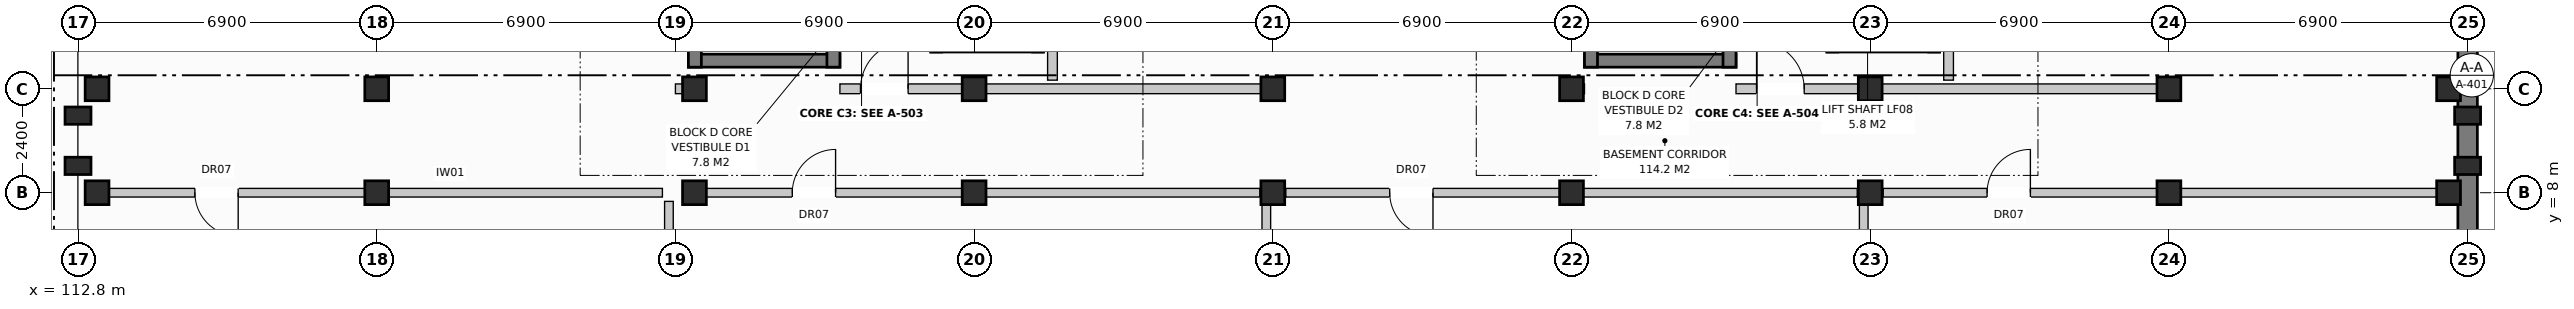
"""IFC4 building model, lengths in metres.
Left out: names, types, materials, properties, quantities, classifications, styles, units other than length and angle.
Written with IfcOpenShell. Run it as: python <this file> out.ifc"""

import sys

from ifc_helpers import new_model, si_unit, direction, frame, frame_2d, origin, origin_with_axes, origin_2d, place, context, subcontext, project, spatial, rectangle, extrude, element, fill, save


model = new_model("IFC4")
c1 = context("Model", 3, precision=1e-05, world=origin(), true_north=direction((0.0, 1.0)))
c2 = subcontext(c1, "Body", "Model", "MODEL_VIEW")
j1 = project(units=[si_unit("LENGTHUNIT", "METRE"), si_unit("PLANEANGLEUNIT", "RADIAN")], contexts=[c1])
p1 = place(None, origin())
s1 = spatial("IfcSite", under=j1, at=p1, CompositionType="ELEMENT")
p2 = place(p1, origin())
s2 = spatial("IfcBuilding", under=s1, at=p2, CompositionType="ELEMENT")
p3 = place(p2, frame((0.0, 0.0, -3.8)))
s3 = spatial("IfcBuildingStorey", under=s2, at=p3, CompositionType="ELEMENT", Elevation=-3.8)
for number, where, z_axis, x_axis in (
    (1, (113.24, 8.0, 0.0), (0.0, 0.0, 1.0), (1.0, 0.0, 0.0)),
    (2, (113.24, 10.4, 0.0), (0.0, 0.0, 1.0), (1.0, 0.0, 0.0)),
    (3, (119.7, 8.0, 0.0), (0.0, 0.0, 1.0), (1.0, 0.0, 0.0)),
    (4, (119.7, 10.4, 0.0), (0.0, 0.0, 1.0), (1.0, 0.0, 0.0)),
    (5, (127.04, 8.0, 0.0), (0.0, 0.0, 1.0), (1.0, 0.0, 0.0)),
    (6, (127.04, 10.4, 0.0), (0.0, 0.0, 1.0), (1.0, 0.0, 0.0)),
    (7, (133.5, 8.0, 0.0), (0.0, 0.0, 1.0), (1.0, 0.0, 0.0)),
    (8, (133.5, 10.4, 0.0), (0.0, 0.0, 1.0), (1.0, 0.0, 0.0)),
    (9, (140.4, 8.0, 0.0), (0.0, 0.0, 1.0), (1.0, 0.0, 0.0)),
    (10, (140.4, 10.4, 0.0), (0.0, 0.0, 1.0), (1.0, 0.0, 0.0)),
    (11, (147.3, 8.0, 0.0), (0.0, 0.0, 1.0), (1.0, 0.0, 0.0)),
    (12, (147.3, 10.4, 0.0), (0.0, 0.0, 1.0), (1.0, 0.0, 0.0)),
    (13, (154.2, 8.0, 0.0), (0.0, 0.0, 1.0), (1.0, 0.0, 0.0)),
    (14, (154.2, 10.4, 0.0), (0.0, 0.0, 1.0), (1.0, 0.0, 0.0)),
    (15, (161.1, 8.0, 0.0), (0.0, 0.0, 1.0), (1.0, 0.0, 0.0)),
    (16, (161.1, 10.4, 0.0), (0.0, 0.0, 1.0), (1.0, 0.0, 0.0)),
    (17, (167.56, 8.0, 0.0), (0.0, 0.0, 1.0), (1.0, 0.0, 0.0)),
    (18, (167.56, 10.4, 0.0), (0.0, 0.0, 1.0), (1.0, 0.0, 0.0)),
):
    element("IfcColumn", number, at=place(p3, frame(where, z_axis=z_axis, x_axis=x_axis)), inside=s3, PredefinedType="COLUMN", context=c2, shape_type="SweptSolid", body=[
        extrude(rectangle(XDim=0.55, YDim=0.55, at=origin_2d()), origin(), (0.0, 0.0, 1.0), 3.8),
    ])
for number, where, z_axis, x_axis in (
    (19, (168.0, 8.62, 0.0), (0.0, 0.0, 1.0), (0.0, 1.0, 0.0)),
    (20, (168.0, 9.78, 0.0), (0.0, 0.0, 1.0), (0.0, 1.0, 0.0)),
    (21, (112.8, 8.62, 0.0), (0.0, 0.0, 1.0), (0.0, 1.0, 0.0)),
    (22, (112.8, 9.78, 0.0), (0.0, 0.0, 1.0), (0.0, 1.0, 0.0)),
):
    element("IfcColumn", number, at=place(p3, frame(where, z_axis=z_axis, x_axis=x_axis)), inside=s3, PredefinedType="PILASTER", context=c2, shape_type="SweptSolid", body=[
        extrude(rectangle(XDim=0.4, YDim=0.6, at=origin_2d()), origin(), (0.0, 0.0, 1.0), 3.8),
    ])
p4 = place(p3, frame((168.0, 0.0, 0.0), z_axis=(0.0, 0.0, 1.0), x_axis=(0.0, 1.0, 0.0)))
e23 = element("IfcWall", 23, at=p4, inside=s3, PredefinedType="STANDARD", context=c2, shape_type="SweptSolid", body=[
    extrude(rectangle(XDim=116.0, YDim=0.45, at=frame_2d((58.0, 0.0))), origin(), (0.0, 0.0, 1.0), 3.48),
])
p5 = place(p3, frame((126.9, 11.05, 0.0), z_axis=(0.0, 0.0, 1.0), x_axis=(1.0, 0.0, 0.0)))
e24 = element("IfcWall", 24, at=p5, inside=s3, PredefinedType="SHEAR", context=c2, shape_type="SweptSolid", body=[
    extrude(rectangle(XDim=3.5, YDim=0.3, at=frame_2d((1.75, 0.0))), origin(), (0.0, 0.0, 1.0), 3.48),
])
p6 = place(p3, frame((127.05, 10.9, 0.0), z_axis=(0.0, 0.0, 1.0), x_axis=(0.0, 1.0, 0.0)))
e25 = element("IfcWall", 25, at=p6, inside=s3, PredefinedType="SHEAR", context=c2, shape_type="SweptSolid", body=[
    extrude(rectangle(XDim=7.5, YDim=0.3, at=frame_2d((3.75, 0.0))), origin(), (0.0, 0.0, 1.0), 3.48),
])
p7 = place(p3, frame((130.25, 10.9, 0.0), z_axis=(0.0, 0.0, 1.0), x_axis=(0.0, 1.0, 0.0)))
e26 = element("IfcWall", 26, at=p7, inside=s3, PredefinedType="SHEAR", context=c2, shape_type="SweptSolid", body=[
    extrude(rectangle(XDim=7.5, YDim=0.3, at=frame_2d((3.75, 0.0))), origin(), (0.0, 0.0, 1.0), 3.48),
])
p8 = place(p7, frame((5.7, 0.0, 0.0)))
e27 = element("IfcOpeningElement", 27, at=p8, cuts=e26, PredefinedType="OPENING", context=c2, shape_type="SweptSolid", body=[
    extrude(rectangle(XDim=1.15, YDim=2.15, at=frame_2d((0.575, 1.075))), frame((0.0, 0.162, 0.0), z_axis=(0.0, -1.0, 0.0), x_axis=(1.0, 0.0, 0.0)), (0.0, 0.0, 1.0), 0.324),
])
p9 = place(p3, frame((135.31, 10.6, 0.0), z_axis=(0.0, 0.0, 1.0), x_axis=(0.0, 1.0, 0.0)))
e28 = element("IfcWall", 28, at=p9, inside=s3, PredefinedType="PARTITIONING", context=c2, shape_type="SweptSolid", body=[
    extrude(rectangle(XDim=7.6, YDim=0.225, at=frame_2d((3.8, 0.0))), origin(), (0.0, 0.0, 1.0), 3.19),
])
p10 = place(p3, frame((126.6, 10.4, 0.0), z_axis=(0.0, 0.0, 1.0), x_axis=(1.0, 0.0, 0.0)))
e29 = element("IfcWall", 29, at=p10, inside=s3, PredefinedType="PARTITIONING", context=c2, shape_type="SweptSolid", body=[
    extrude(rectangle(XDim=0.3, YDim=0.225, at=frame_2d((0.15, 0.0))), origin(), (0.0, 0.0, 1.0), 3.48),
])
p11 = place(p3, frame((130.4, 10.4, 0.0), z_axis=(0.0, 0.0, 1.0), x_axis=(1.0, 0.0, 0.0)))
e30 = element("IfcWall", 30, at=p11, inside=s3, PredefinedType="PARTITIONING", context=c2, shape_type="SweptSolid", body=[
    extrude(rectangle(XDim=10.0, YDim=0.225, at=frame_2d((5.0, 0.0))), origin(), (0.0, 0.0, 1.0), 2.92),
])
p12 = place(p11, frame((0.475, 0.0, 0.0)))
e31 = element("IfcOpeningElement", 31, at=p12, cuts=e30, PredefinedType="OPENING", context=c2, shape_type="SweptSolid", body=[
    extrude(rectangle(XDim=1.1, YDim=2.15, at=frame_2d((0.55, 1.075))), frame((0.0, 0.125, 0.0), z_axis=(0.0, -1.0, 0.0), x_axis=(1.0, 0.0, 0.0)), (0.0, 0.0, 1.0), 0.249),
])
p13 = place(p3, frame((147.6, 11.05, 0.0), z_axis=(0.0, 0.0, 1.0), x_axis=(1.0, 0.0, 0.0)))
e32 = element("IfcWall", 32, at=p13, inside=s3, PredefinedType="SHEAR", context=c2, shape_type="SweptSolid", body=[
    extrude(rectangle(XDim=3.5, YDim=0.3, at=frame_2d((1.75, 0.0))), origin(), (0.0, 0.0, 1.0), 3.48),
])
p14 = place(p3, frame((147.75, 10.9, 0.0), z_axis=(0.0, 0.0, 1.0), x_axis=(0.0, 1.0, 0.0)))
e33 = element("IfcWall", 33, at=p14, inside=s3, PredefinedType="SHEAR", context=c2, shape_type="SweptSolid", body=[
    extrude(rectangle(XDim=7.5, YDim=0.3, at=frame_2d((3.75, 0.0))), origin(), (0.0, 0.0, 1.0), 3.48),
])
p15 = place(p3, frame((150.95, 10.9, 0.0), z_axis=(0.0, 0.0, 1.0), x_axis=(0.0, 1.0, 0.0)))
e34 = element("IfcWall", 34, at=p15, inside=s3, PredefinedType="SHEAR", context=c2, shape_type="SweptSolid", body=[
    extrude(rectangle(XDim=7.5, YDim=0.3, at=frame_2d((3.75, 0.0))), origin(), (0.0, 0.0, 1.0), 3.48),
])
p16 = place(p15, frame((5.7, 0.0, 0.0)))
e35 = element("IfcOpeningElement", 35, at=p16, cuts=e34, PredefinedType="OPENING", context=c2, shape_type="SweptSolid", body=[
    extrude(rectangle(XDim=1.15, YDim=2.15, at=frame_2d((0.575, 1.075))), frame((0.0, 0.162, 0.0), z_axis=(0.0, -1.0, 0.0), x_axis=(1.0, 0.0, 0.0)), (0.0, 0.0, 1.0), 0.324),
])
p17 = place(p3, frame((156.01, 10.6, 0.0), z_axis=(0.0, 0.0, 1.0), x_axis=(0.0, 1.0, 0.0)))
e36 = element("IfcWall", 36, at=p17, inside=s3, PredefinedType="PARTITIONING", context=c2, shape_type="SweptSolid", body=[
    extrude(rectangle(XDim=7.6, YDim=0.225, at=frame_2d((3.8, 0.0))), origin(), (0.0, 0.0, 1.0), 3.19),
])
p18 = place(p3, frame((147.3, 10.4, 0.0), z_axis=(0.0, 0.0, 1.0), x_axis=(1.0, 0.0, 0.0)))
e37 = element("IfcWall", 37, at=p18, inside=s3, PredefinedType="PARTITIONING", context=c2, shape_type="SweptSolid", body=[
    extrude(rectangle(XDim=0.3, YDim=0.225, at=frame_2d((0.15, 0.0))), origin(), (0.0, 0.0, 1.0), 3.48),
])
p19 = place(p3, frame((151.1, 10.4, 0.0), z_axis=(0.0, 0.0, 1.0), x_axis=(1.0, 0.0, 0.0)))
e38 = element("IfcWall", 38, at=p19, inside=s3, PredefinedType="PARTITIONING", context=c2, shape_type="SweptSolid", body=[
    extrude(rectangle(XDim=10.0, YDim=0.225, at=frame_2d((5.0, 0.0))), origin(), (0.0, 0.0, 1.0), 2.92),
])
p20 = place(p19, frame((0.475, 0.0, 0.0)))
e39 = element("IfcOpeningElement", 39, at=p20, cuts=e38, PredefinedType="OPENING", context=c2, shape_type="SweptSolid", body=[
    extrude(rectangle(XDim=1.1, YDim=2.15, at=frame_2d((0.55, 1.075))), frame((0.0, 0.125, 0.0), z_axis=(0.0, -1.0, 0.0), x_axis=(1.0, 0.0, 0.0)), (0.0, 0.0, 1.0), 0.249),
])
p21 = place(p3, frame((113.1, 8.0, 0.0), z_axis=(0.0, 0.0, 1.0), x_axis=(1.0, 0.0, 0.0)))
e40 = element("IfcWall", 40, at=p21, inside=s3, PredefinedType="PARTITIONING", context=c2, shape_type="SweptSolid", body=[
    extrude(rectangle(XDim=13.2, YDim=0.2, at=frame_2d((6.6, 0.0))), origin(), (0.0, 0.0, 1.0), 2.92),
])
p22 = place(p21, frame((2.4, 0.0, 0.0)))
e41 = element("IfcOpeningElement", 41, at=p22, cuts=e40, PredefinedType="OPENING", context=c2, shape_type="SweptSolid", body=[
    extrude(rectangle(XDim=1.0, YDim=2.15, at=frame_2d((0.5, 1.075))), frame((0.0, 0.112, 0.0), z_axis=(0.0, -1.0, 0.0), x_axis=(1.0, 0.0, 0.0)), (0.0, 0.0, 1.0), 0.224),
])
p23 = place(p3, frame((126.45, 0.3, 0.0), z_axis=(0.0, 0.0, 1.0), x_axis=(0.0, 1.0, 0.0)))
e42 = element("IfcWall", 42, at=p23, inside=s3, PredefinedType="PARTITIONING", context=c2, shape_type="SweptSolid", body=[
    extrude(rectangle(XDim=7.5, YDim=0.2, at=frame_2d((3.75, 0.0))), origin(), (0.0, 0.0, 1.0), 3.48),
])
p24 = place(p3, frame((126.9, 8.0, 0.0), z_axis=(0.0, 0.0, 1.0), x_axis=(1.0, 0.0, 0.0)))
e43 = element("IfcWall", 43, at=p24, inside=s3, PredefinedType="PARTITIONING", context=c2, shape_type="SweptSolid", body=[
    extrude(rectangle(XDim=13.2, YDim=0.2, at=frame_2d((6.6, 0.0))), origin(), (0.0, 0.0, 1.0), 2.92),
])
p25 = place(p24, frame((2.4, 0.0, 0.0)))
e44 = element("IfcOpeningElement", 44, at=p25, cuts=e43, PredefinedType="OPENING", context=c2, shape_type="SweptSolid", body=[
    extrude(rectangle(XDim=1.0, YDim=2.15, at=frame_2d((0.5, 1.075))), frame((0.0, 0.112, 0.0), z_axis=(0.0, -1.0, 0.0), x_axis=(1.0, 0.0, 0.0)), (0.0, 0.0, 1.0), 0.224),
])
p26 = place(p3, frame((140.25, 0.3, 0.0), z_axis=(0.0, 0.0, 1.0), x_axis=(0.0, 1.0, 0.0)))
e45 = element("IfcWall", 45, at=p26, inside=s3, PredefinedType="PARTITIONING", context=c2, shape_type="SweptSolid", body=[
    extrude(rectangle(XDim=7.5, YDim=0.2, at=frame_2d((3.75, 0.0))), origin(), (0.0, 0.0, 1.0), 3.48),
])
p27 = place(p3, frame((140.7, 8.0, 0.0), z_axis=(0.0, 0.0, 1.0), x_axis=(1.0, 0.0, 0.0)))
e46 = element("IfcWall", 46, at=p27, inside=s3, PredefinedType="PARTITIONING", context=c2, shape_type="SweptSolid", body=[
    extrude(rectangle(XDim=13.2, YDim=0.2, at=frame_2d((6.6, 0.0))), origin(), (0.0, 0.0, 1.0), 2.92),
])
p28 = place(p27, frame((2.4, 0.0, 0.0)))
e47 = element("IfcOpeningElement", 47, at=p28, cuts=e46, PredefinedType="OPENING", context=c2, shape_type="SweptSolid", body=[
    extrude(rectangle(XDim=1.0, YDim=2.15, at=frame_2d((0.5, 1.075))), frame((0.0, 0.112, 0.0), z_axis=(0.0, -1.0, 0.0), x_axis=(1.0, 0.0, 0.0)), (0.0, 0.0, 1.0), 0.224),
])
p29 = place(p3, frame((154.05, 0.3, 0.0), z_axis=(0.0, 0.0, 1.0), x_axis=(0.0, 1.0, 0.0)))
e48 = element("IfcWall", 48, at=p29, inside=s3, PredefinedType="PARTITIONING", context=c2, shape_type="SweptSolid", body=[
    extrude(rectangle(XDim=7.5, YDim=0.2, at=frame_2d((3.75, 0.0))), origin(), (0.0, 0.0, 1.0), 3.48),
])
p30 = place(p3, frame((154.5, 8.0, 0.0), z_axis=(0.0, 0.0, 1.0), x_axis=(1.0, 0.0, 0.0)))
e49 = element("IfcWall", 49, at=p30, inside=s3, PredefinedType="PARTITIONING", context=c2, shape_type="SweptSolid", body=[
    extrude(rectangle(XDim=13.2, YDim=0.2, at=frame_2d((6.6, 0.0))), origin(), (0.0, 0.0, 1.0), 2.92),
])
p31 = place(p30, frame((2.4, 0.0, 0.0)))
e50 = element("IfcOpeningElement", 50, at=p31, cuts=e49, PredefinedType="OPENING", context=c2, shape_type="SweptSolid", body=[
    extrude(rectangle(XDim=1.0, YDim=2.15, at=frame_2d((0.5, 1.075))), frame((0.0, 0.112, 0.0), z_axis=(0.0, -1.0, 0.0), x_axis=(1.0, 0.0, 0.0)), (0.0, 0.0, 1.0), 0.224),
])
p32 = place(p12, origin_with_axes())
e51 = element("IfcDoor", 51, at=p32, inside=s3, OperationType="SINGLE_SWING_RIGHT", PredefinedType="DOOR", context=c2, shape_type="SweptSolid", body=[
    extrude(rectangle(XDim=1.1, YDim=2.15, at=frame_2d((0.55, 1.075))), frame((0.0, 0.025, 0.0), z_axis=(0.0, -1.0, 0.0), x_axis=(1.0, 0.0, 0.0)), (0.0, 0.0, 1.0), 0.05),
])
fill(e31, e51)
p33 = place(p20, origin_with_axes())
e52 = element("IfcDoor", 52, at=p33, inside=s3, OperationType="SINGLE_SWING_LEFT", PredefinedType="DOOR", context=c2, shape_type="SweptSolid", body=[
    extrude(rectangle(XDim=1.1, YDim=2.15, at=frame_2d((0.55, 1.075))), frame((0.0, 0.025, 0.0), z_axis=(0.0, -1.0, 0.0), x_axis=(1.0, 0.0, 0.0)), (0.0, 0.0, 1.0), 0.05),
])
fill(e39, e52)
p34 = place(p22, frame((1.0, 0.0, 0.0), z_axis=(0.0, 0.0, 1.0), x_axis=(-1.0, 0.0, 0.0)))
e53 = element("IfcDoor", 53, at=p34, inside=s3, OperationType="SINGLE_SWING_RIGHT", PredefinedType="DOOR", context=c2, shape_type="SweptSolid", body=[
    extrude(rectangle(XDim=1.0, YDim=2.15, at=frame_2d((0.5, 1.075))), frame((0.0, 0.025, 0.0), z_axis=(0.0, -1.0, 0.0), x_axis=(1.0, 0.0, 0.0)), (0.0, 0.0, 1.0), 0.05),
])
fill(e41, e53)
p35 = place(p25, origin_with_axes())
e54 = element("IfcDoor", 54, at=p35, inside=s3, OperationType="SINGLE_SWING_RIGHT", PredefinedType="DOOR", context=c2, shape_type="SweptSolid", body=[
    extrude(rectangle(XDim=1.0, YDim=2.15, at=frame_2d((0.5, 1.075))), frame((0.0, 0.025, 0.0), z_axis=(0.0, -1.0, 0.0), x_axis=(1.0, 0.0, 0.0)), (0.0, 0.0, 1.0), 0.05),
])
fill(e44, e54)
p36 = place(p28, frame((1.0, 0.0, 0.0), z_axis=(0.0, 0.0, 1.0), x_axis=(-1.0, 0.0, 0.0)))
e55 = element("IfcDoor", 55, at=p36, inside=s3, OperationType="SINGLE_SWING_RIGHT", PredefinedType="DOOR", context=c2, shape_type="SweptSolid", body=[
    extrude(rectangle(XDim=1.0, YDim=2.15, at=frame_2d((0.5, 1.075))), frame((0.0, 0.025, 0.0), z_axis=(0.0, -1.0, 0.0), x_axis=(1.0, 0.0, 0.0)), (0.0, 0.0, 1.0), 0.05),
])
fill(e47, e55)
p37 = place(p31, origin_with_axes())
e56 = element("IfcDoor", 56, at=p37, inside=s3, OperationType="SINGLE_SWING_RIGHT", PredefinedType="DOOR", context=c2, shape_type="SweptSolid", body=[
    extrude(rectangle(XDim=1.0, YDim=2.15, at=frame_2d((0.5, 1.075))), frame((0.0, 0.025, 0.0), z_axis=(0.0, -1.0, 0.0), x_axis=(1.0, 0.0, 0.0)), (0.0, 0.0, 1.0), 0.05),
])
fill(e50, e56)
save(model, sys.argv[1])
